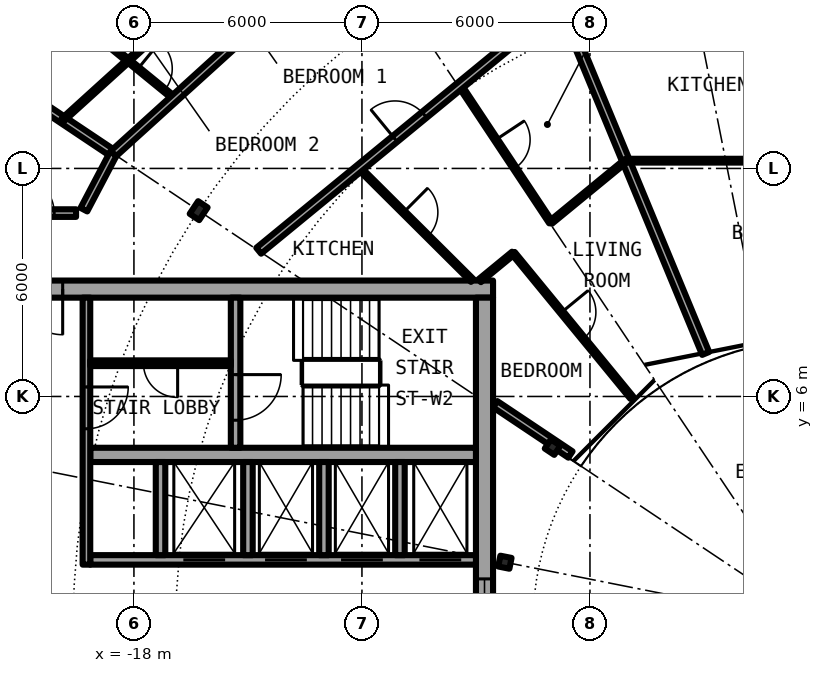
"""IFC4 building model, lengths in metres.
Left out: names, types, materials, properties, quantities, classifications, styles, units other than length and angle.
Written with IfcOpenShell. Run it as: python <this file> out.ifc"""

import sys

from ifc_helpers import new_model, si_unit, direction, frame, frame_2d, origin, origin_2d, place, context, subcontext, project, spatial, rectangle, i_section, extrude, element, fill, save


model = new_model("IFC4")
c1 = context("Model", 3, precision=1e-05, world=origin(), true_north=direction((0.0, 1.0)))
c2 = subcontext(c1, "Body", "Model", "MODEL_VIEW")
j1 = project(units=[si_unit("LENGTHUNIT", "METRE"), si_unit("PLANEANGLEUNIT", "RADIAN")], contexts=[c1])
p1 = place(None, origin())
s1 = spatial("IfcSite", under=j1, at=p1, CompositionType="ELEMENT")
p2 = place(p1, origin())
s2 = spatial("IfcBuilding", under=s1, at=p2, CompositionType="ELEMENT")
p3 = place(p2, frame((0.0, 0.0, 212.7)))
s3 = spatial("IfcBuildingStorey", under=s2, at=p3, CompositionType="ELEMENT", Elevation=212.7)
p4 = place(p3, frame((-16.297, 10.889, 0.0), z_axis=(0.0, 0.0, 1.0), x_axis=(-0.831469612303, 0.55557023302, 0.0)))
e1 = element("IfcColumn", 1, at=p4, inside=s3, PredefinedType="COLUMN", context=c2, shape_type="SweptSolid", body=[
    extrude(i_section(OverallWidth=0.3, OverallDepth=0.4, WebThickness=0.013, FlangeThickness=0.024, FilletRadius=0.027, at=origin_2d()), origin(), (0.0, 0.0, 1.0), 3.05),
])
for number, where, z_axis, x_axis in (
    (2, (-6.984, 4.667, 0.0), (0.0, 0.0, 1.0), (-0.831, 0.556, 0.0)),
    (3, (-8.239, 1.639, 0.0), (0.0, 0.0, 1.0), (-0.981, 0.195, 0.0)),
):
    element("IfcColumn", number, at=place(p3, frame(where, z_axis=z_axis, x_axis=x_axis)), inside=s3, PredefinedType="COLUMN", context=c2, shape_type="SweptSolid", body=[
        extrude(i_section(OverallWidth=0.3, OverallDepth=0.29, WebThickness=0.009, FlangeThickness=0.014, FilletRadius=0.027, at=origin_2d()), origin(), (0.0, 0.0, 1.0), 3.05),
    ])
p5 = place(p3, frame((-8.55, 8.825, 0.0), z_axis=(0.0, 0.0, 1.0), x_axis=(-1.0, 0.0, 0.0)))
e4 = element("IfcWall", 4, at=p5, inside=s3, PredefinedType="SHEAR", context=c2, shape_type="SweptSolid", body=[
    extrude(rectangle(XDim=13.5, YDim=0.45, at=frame_2d((6.75, 0.0))), origin(), (0.0, 0.0, 1.0), 3.05),
])
p6 = place(p5, frame((11.325, 0.0, 0.0)))
e5 = element("IfcOpeningElement", 5, at=p6, cuts=e4, PredefinedType="OPENING", context=c2, shape_type="SweptSolid", body=[
    extrude(rectangle(XDim=1.2, YDim=2.3, at=frame_2d((0.6, 1.15))), frame((0.0, 0.235, 0.0), z_axis=(0.0, -1.0, 0.0), x_axis=(1.0, 0.0, 0.0)), (0.0, 0.0, 1.0), 0.47),
])
p7 = place(p3, frame((-8.775, 8.6, 0.0), z_axis=(0.0, 0.0, 1.0), x_axis=(0.0, -1.0, 0.0)))
e6 = element("IfcWall", 6, at=p7, inside=s3, PredefinedType="SHEAR", context=c2, shape_type="SweptSolid", body=[
    extrude(rectangle(XDim=17.2, YDim=0.45, at=frame_2d((8.6, 0.0))), origin(), (0.0, 0.0, 1.0), 3.05),
])
p8 = place(p7, frame((7.4, 0.0, 0.1)))
e7 = element("IfcOpeningElement", 7, at=p8, cuts=e6, PredefinedType="OPENING", context=c2, shape_type="SweptSolid", body=[
    extrude(rectangle(XDim=2.4, YDim=2.2, at=frame_2d((1.2, 1.1))), frame((0.0, 0.235, 0.0), z_axis=(0.0, -1.0, 0.0), x_axis=(1.0, 0.0, 0.0)), (0.0, 0.0, 1.0), 0.47),
])
p9 = place(p3, frame((-9.0, 1.7, 0.0), z_axis=(0.0, 0.0, 1.0), x_axis=(-1.0, 0.0, 0.0)))
e8 = element("IfcWall", 8, at=p9, inside=s3, PredefinedType="SHEAR", context=c2, shape_type="SweptSolid", body=[
    extrude(rectangle(XDim=10.15, YDim=0.25, at=frame_2d((5.075, 0.0))), origin(), (0.0, 0.0, 1.0), 3.05),
])
p10 = place(p9, frame((0.387, 0.0, 0.0)))
e9 = element("IfcOpeningElement", 9, at=p10, cuts=e8, PredefinedType="OPENING", context=c2, shape_type="SweptSolid", body=[
    extrude(rectangle(XDim=1.1, YDim=2.3, at=frame_2d((0.55, 1.15))), frame((0.0, 0.135, 0.0), z_axis=(0.0, -1.0, 0.0), x_axis=(1.0, 0.0, 0.0)), (0.0, 0.0, 1.0), 0.27),
])
p11 = place(p9, frame((2.45, 0.0, 0.0)))
e10 = element("IfcOpeningElement", 10, at=p11, cuts=e8, PredefinedType="OPENING", context=c2, shape_type="SweptSolid", body=[
    extrude(rectangle(XDim=1.1, YDim=2.3, at=frame_2d((0.55, 1.15))), frame((0.0, 0.135, 0.0), z_axis=(0.0, -1.0, 0.0), x_axis=(1.0, 0.0, 0.0)), (0.0, 0.0, 1.0), 0.27),
])
p12 = place(p9, frame((4.45, 0.0, 0.0)))
e11 = element("IfcOpeningElement", 11, at=p12, cuts=e8, PredefinedType="OPENING", context=c2, shape_type="SweptSolid", body=[
    extrude(rectangle(XDim=1.1, YDim=2.3, at=frame_2d((0.55, 1.15))), frame((0.0, 0.135, 0.0), z_axis=(0.0, -1.0, 0.0), x_axis=(1.0, 0.0, 0.0)), (0.0, 0.0, 1.0), 0.27),
])
p13 = place(p9, frame((6.6, 0.0, 0.0)))
e12 = element("IfcOpeningElement", 12, at=p13, cuts=e8, PredefinedType="OPENING", context=c2, shape_type="SweptSolid", body=[
    extrude(rectangle(XDim=1.1, YDim=2.3, at=frame_2d((0.55, 1.15))), frame((0.0, 0.135, 0.0), z_axis=(0.0, -1.0, 0.0), x_axis=(1.0, 0.0, 0.0)), (0.0, 0.0, 1.0), 0.27),
])
p14 = place(p3, frame((-9.0, 4.462, 0.0), z_axis=(0.0, 0.0, 1.0), x_axis=(-1.0, 0.0, 0.0)))
e13 = element("IfcWall", 13, at=p14, inside=s3, PredefinedType="SHEAR", context=c2, shape_type="SweptSolid", body=[
    extrude(rectangle(XDim=10.15, YDim=0.375, at=frame_2d((5.075, 0.0))), origin(), (0.0, 0.0, 1.0), 3.05),
])
p15 = place(p3, frame((-15.325, 8.6, 0.0), z_axis=(0.0, 0.0, 1.0), x_axis=(0.0, -1.0, 0.0)))
e14 = element("IfcWall", 14, at=p15, inside=s3, PredefinedType="SHEAR", context=c2, shape_type="SweptSolid", body=[
    extrude(rectangle(XDim=3.95, YDim=0.25, at=frame_2d((1.975, 0.0))), origin(), (0.0, 0.0, 1.0), 3.05),
])
p16 = place(p15, frame((2.025, 0.0, 0.0)))
e15 = element("IfcOpeningElement", 15, at=p16, cuts=e14, PredefinedType="OPENING", context=c2, shape_type="SweptSolid", body=[
    extrude(rectangle(XDim=1.2, YDim=2.3, at=frame_2d((0.6, 1.15))), frame((0.0, 0.135, 0.0), z_axis=(0.0, -1.0, 0.0), x_axis=(1.0, 0.0, 0.0)), (0.0, 0.0, 1.0), 0.27),
])
for number, where, z_axis, x_axis in (
    (16, (-15.0, 1.825, 0.0), (0.0, 0.0, 1.0), (0.0, 1.0, 0.0)),
    (17, (-17.3, 1.825, 0.0), (0.0, 0.0, 1.0), (0.0, 1.0, 0.0)),
):
    element("IfcWall", number, at=place(p3, frame(where, z_axis=z_axis, x_axis=x_axis)), inside=s3, PredefinedType="SOLIDWALL", context=c2, shape_type="SweptSolid", body=[
        extrude(rectangle(XDim=2.45, YDim=0.25, at=frame_2d((1.225, 0.0))), origin(), (0.0, 0.0, 1.0), 2.7),
    ])
p17 = place(p3, frame((-19.25, 8.6, 0.0), z_axis=(0.0, 0.0, 1.0), x_axis=(0.0, -1.0, 0.0)))
e18 = element("IfcWall", 18, at=p17, inside=s3, PredefinedType="SOLIDWALL", context=c2, shape_type="SweptSolid", body=[
    extrude(rectangle(XDim=7.025, YDim=0.2, at=frame_2d((3.513, 0.0))), origin(), (0.0, 0.0, 1.0), 2.7),
])
p18 = place(p17, frame((2.35, 0.0, 0.0)))
e19 = element("IfcOpeningElement", 19, at=p18, cuts=e18, PredefinedType="OPENING", context=c2, shape_type="SweptSolid", body=[
    extrude(rectangle(XDim=1.1, YDim=2.3, at=frame_2d((0.55, 1.15))), frame((0.0, 0.11, 0.0), z_axis=(0.0, -1.0, 0.0), x_axis=(1.0, 0.0, 0.0)), (0.0, 0.0, 1.0), 0.22),
])
for number, where, z_axis, x_axis in (
    (20, (-11.0, 1.825, 0.0), (0.0, 0.0, 1.0), (0.0, 1.0, 0.0)),
    (21, (-13.0, 1.825, 0.0), (0.0, 0.0, 1.0), (0.0, 1.0, 0.0)),
):
    element("IfcWall", number, at=place(p3, frame(where, z_axis=z_axis, x_axis=x_axis)), inside=s3, PredefinedType="SOLIDWALL", context=c2, shape_type="SweptSolid", body=[
        extrude(rectangle(XDim=2.45, YDim=0.25, at=frame_2d((1.225, 0.0))), origin(), (0.0, 0.0, 1.0), 2.7),
    ])
p19 = place(p3, frame((-15.45, 6.875, 0.0), z_axis=(0.0, 0.0, 1.0), x_axis=(-1.0, 0.0, 0.0)))
e22 = element("IfcWall", 22, at=p19, inside=s3, PredefinedType="PARTITIONING", context=c2, shape_type="SweptSolid", body=[
    extrude(rectangle(XDim=3.7, YDim=0.15, at=frame_2d((1.85, 0.0))), origin(), (0.0, 0.0, 1.0), 2.7),
])
p20 = place(p19, frame((1.4, 0.0, 0.0)))
e23 = element("IfcOpeningElement", 23, at=p20, cuts=e22, PredefinedType="OPENING", context=c2, shape_type="SweptSolid", body=[
    extrude(rectangle(XDim=0.9, YDim=2.3, at=frame_2d((0.45, 1.15))), frame((0.0, 0.085, 0.0), z_axis=(0.0, -1.0, 0.0), x_axis=(1.0, 0.0, 0.0)), (0.0, 0.0, 1.0), 0.17),
])
p21 = place(p3, frame((-22.595, 15.098, 0.0), z_axis=(0.0, 0.0, 1.0), x_axis=(0.831387096605, -0.55569370664, 0.0)))
e24 = element("IfcWall", 24, at=p21, inside=s3, PredefinedType="PARTITIONING", context=c2, shape_type="SweptSolid", body=[
    extrude(rectangle(XDim=4.875, YDim=0.2, at=frame_2d((2.438, 0.0))), origin(), (0.0, 0.0, 1.0), 2.7),
])
p22 = place(p3, frame((-21.04, 17.199, 0.0), z_axis=(0.0, 0.0, 1.0), x_axis=(0.774310172558, -0.632806255241, 0.0)))
e25 = element("IfcWall", 25, at=p22, inside=s3, PredefinedType="PARTITIONING", context=c2, shape_type="SweptSolid", body=[
    extrude(rectangle(XDim=5.3, YDim=0.1, at=frame_2d((2.65, 0.0))), origin(), (0.0, 0.0, 1.0), 2.7),
])
p23 = place(p22, frame((4.066, 0.0, 0.0)))
e26 = element("IfcOpeningElement", 26, at=p23, cuts=e25, PredefinedType="OPENING", context=c2, shape_type="SweptSolid", body=[
    extrude(rectangle(XDim=0.9, YDim=2.3, at=frame_2d((0.45, 1.15))), frame((0.0, 0.06, 0.0), z_axis=(0.0, -1.0, 0.0), x_axis=(1.0, 0.0, 0.0)), (0.0, 0.0, 1.0), 0.12),
])
p24 = place(p22, frame((1.416, 0.0, 0.0)))
e27 = element("IfcOpeningElement", 27, at=p24, cuts=e25, PredefinedType="OPENING", context=c2, shape_type="SweptSolid", body=[
    extrude(rectangle(XDim=0.9, YDim=2.3, at=frame_2d((0.45, 1.15))), frame((0.0, 0.06, 0.0), z_axis=(0.0, -1.0, 0.0), x_axis=(1.0, 0.0, 0.0)), (0.0, 0.0, 1.0), 0.12),
])
p25 = place(p3, frame((-12.069, 12.007, 0.0), z_axis=(0.0, 0.0, 1.0), x_axis=(0.708909651863, -0.705299302067, 0.0)))
e28 = element("IfcWall", 28, at=p25, inside=s3, PredefinedType="PARTITIONING", context=c2, shape_type="SweptSolid", body=[
    extrude(rectangle(XDim=4.193, YDim=0.1, at=frame_2d((2.096, 0.0))), origin(), (0.0, 0.0, 1.0), 2.7),
])
p26 = place(p25, frame((1.646, 0.0, 0.0)))
e29 = element("IfcOpeningElement", 29, at=p26, cuts=e28, PredefinedType="OPENING", context=c2, shape_type="SweptSolid", body=[
    extrude(rectangle(XDim=0.9, YDim=2.3, at=frame_2d((0.45, 1.15))), frame((0.0, 0.06, 0.0), z_axis=(0.0, -1.0, 0.0), x_axis=(1.0, 0.0, 0.0)), (0.0, 0.0, 1.0), 0.12),
])
p27 = place(p3, frame((-9.421, 14.18, 0.0), z_axis=(0.0, 0.0, 1.0), x_axis=(0.553303732327, -0.832979579457, 0.0)))
e30 = element("IfcWall", 30, at=p27, inside=s3, PredefinedType="PARTITIONING", context=c2, shape_type="SweptSolid", body=[
    extrude(rectangle(XDim=4.319, YDim=0.1, at=frame_2d((2.16, 0.0))), origin(), (0.0, 0.0, 1.0), 2.7),
])
p28 = place(p27, frame((1.71, 0.0, 0.0)))
e31 = element("IfcOpeningElement", 31, at=p28, cuts=e30, PredefinedType="OPENING", context=c2, shape_type="SweptSolid", body=[
    extrude(rectangle(XDim=0.9, YDim=2.3, at=frame_2d((0.45, 1.15))), frame((0.0, 0.06, 0.0), z_axis=(0.0, -1.0, 0.0), x_axis=(1.0, 0.0, 0.0)), (0.0, 0.0, 1.0), 0.12),
])
p29 = place(p3, frame((-8.019, 9.771, 0.0), z_axis=(0.0, 0.0, 1.0), x_axis=(0.634401778971, -0.773003481776, 0.0)))
e32 = element("IfcWall", 32, at=p29, inside=s3, PredefinedType="PARTITIONING", context=c2, shape_type="SweptSolid", body=[
    extrude(rectangle(XDim=4.92, YDim=0.1, at=frame_2d((2.46, 0.0))), origin(), (0.0, 0.0, 1.0), 2.7),
])
p30 = place(p29, frame((2.01, 0.0, 0.0)))
e33 = element("IfcOpeningElement", 33, at=p30, cuts=e32, PredefinedType="OPENING", context=c2, shape_type="SweptSolid", body=[
    extrude(rectangle(XDim=0.9, YDim=2.3, at=frame_2d((0.45, 1.15))), frame((0.0, 0.06, 0.0), z_axis=(0.0, -1.0, 0.0), x_axis=(1.0, 0.0, 0.0)), (0.0, 0.0, 1.0), 0.12),
])
p31 = place(p3, frame((-6.773, 16.353, 0.0), z_axis=(0.0, 0.0, 1.0), x_axis=(0.382549125466, -0.923935152814, 0.0)))
e34 = element("IfcWall", 34, at=p31, inside=s3, PredefinedType="PARTITIONING", context=c2, shape_type="SweptSolid", body=[
    extrude(rectangle(XDim=9.98, YDim=0.2, at=frame_2d((4.99, 0.0))), origin(), (0.0, 0.0, 1.0), 2.7),
])
p32 = place(p3, frame((-6.513, 4.472, 0.0), z_axis=(0.0, 0.0, 1.0), x_axis=(-0.831403409976, 0.555669299026, 0.0)))
e35 = element("IfcWall", 35, at=p32, inside=s3, PredefinedType="PARTITIONING", context=c2, shape_type="SweptSolid", body=[
    extrude(rectangle(XDim=2.383, YDim=0.2, at=frame_2d((1.191, 0.0))), origin(), (0.0, 0.0, 1.0), 2.7),
])
p33 = place(p3, frame((-21.675, 10.825, 0.0), z_axis=(0.0, 0.0, 1.0), x_axis=(1.0, 0.0, 0.0)))
e36 = element("IfcWall", 36, at=p33, inside=s3, PredefinedType="PARTITIONING", context=c2, shape_type="SweptSolid", body=[
    extrude(rectangle(XDim=2.152, YDim=0.2, at=frame_2d((1.076, 0.0))), origin(), (0.0, 0.0, 1.0), 2.7),
])
p34 = place(p33, frame((0.576, 0.0, 0.0)))
e37 = element("IfcOpeningElement", 37, at=p34, cuts=e36, PredefinedType="OPENING", context=c2, shape_type="SweptSolid", body=[
    extrude(rectangle(XDim=1.0, YDim=2.3, at=frame_2d((0.5, 1.15))), frame((0.0, 0.11, 0.0), z_axis=(0.0, -1.0, 0.0), x_axis=(1.0, 0.0, 0.0)), (0.0, 0.0, 1.0), 0.22),
])
p35 = place(p3, frame((-5.055, 12.204, 0.0), z_axis=(0.0, 0.0, 1.0), x_axis=(1.0, 0.0, 0.0)))
e38 = element("IfcWall", 38, at=p35, inside=s3, PredefinedType="PARTITIONING", context=c2, shape_type="SweptSolid", body=[
    extrude(rectangle(XDim=6.319, YDim=0.1, at=frame_2d((3.159, 0.0))), origin(), (0.0, 0.0, 1.0), 2.7),
])
p36 = place(p3, frame((-8.902, 9.046, 0.0), z_axis=(0.0, 0.0, 1.0), x_axis=(0.772842270779, 0.63459815986, 0.0)))
e39 = element("IfcWall", 39, at=p36, inside=s3, PredefinedType="PARTITIONING", context=c2, shape_type="SweptSolid", body=[
    extrude(rectangle(XDim=1.143, YDim=0.1, at=frame_2d((0.571, 0.0))), origin(), (0.0, 0.0, 1.0), 2.7),
])
p37 = place(p3, frame((-7.033, 10.581, 0.0), z_axis=(0.0, 0.0, 1.0), x_axis=(0.772990508216, 0.634417586617, 0.0)))
e40 = element("IfcWall", 40, at=p37, inside=s3, PredefinedType="PARTITIONING", context=c2, shape_type="SweptSolid", body=[
    extrude(rectangle(XDim=2.556, YDim=0.1, at=frame_2d((1.278, 0.0))), origin(), (0.0, 0.0, 1.0), 2.7),
])
p38 = place(p3, frame((-14.717, 9.834, 0.0), z_axis=(0.0, 0.0, 1.0), x_axis=(0.773034536097, 0.634363938131, 0.0)))
e41 = element("IfcWall", 41, at=p38, inside=s3, PredefinedType="PARTITIONING", context=c2, shape_type="SweptSolid", body=[
    extrude(rectangle(XDim=10.277, YDim=0.2, at=frame_2d((5.138, 0.0))), origin(), (0.0, 0.0, 1.0), 2.7),
])
p39 = place(p38, frame((4.638, 0.0, 0.0)))
e42 = element("IfcOpeningElement", 42, at=p39, cuts=e41, PredefinedType="OPENING", context=c2, shape_type="SweptSolid", body=[
    extrude(rectangle(XDim=1.0, YDim=2.3, at=frame_2d((0.5, 1.15))), frame((0.0, 0.11, 0.0), z_axis=(0.0, -1.0, 0.0), x_axis=(1.0, 0.0, 0.0)), (0.0, 0.0, 1.0), 0.22),
])
p40 = place(p3, frame((-18.543, 12.386, 0.0), z_axis=(0.0, 0.0, 1.0), x_axis=(0.740853508928, 0.671666642248, 0.0)))
e43 = element("IfcWall", 43, at=p40, inside=s3, PredefinedType="PARTITIONING", context=c2, shape_type="SweptSolid", body=[
    extrude(rectangle(XDim=10.84, YDim=0.2, at=frame_2d((5.42, 0.0))), origin(), (0.0, 0.0, 1.0), 2.7),
])
p41 = place(p40, frame((4.921, 0.0, 0.0)))
e44 = element("IfcOpeningElement", 44, at=p41, cuts=e43, PredefinedType="OPENING", context=c2, shape_type="SweptSolid", body=[
    extrude(rectangle(XDim=1.0, YDim=2.3, at=frame_2d((0.5, 1.15))), frame((0.0, 0.11, 0.0), z_axis=(0.0, -1.0, 0.0), x_axis=(1.0, 0.0, 0.0)), (0.0, 0.0, 1.0), 0.22),
])
p42 = place(p3, frame((-19.317, 10.915, 0.0), z_axis=(0.0, 0.0, 1.0), x_axis=(0.465359652486, 0.885121683068, 0.0)))
e45 = element("IfcWall", 45, at=p42, inside=s3, PredefinedType="PARTITIONING", context=c2, shape_type="SweptSolid", body=[
    extrude(rectangle(XDim=1.665, YDim=0.2, at=frame_2d((0.833, 0.0))), origin(), (0.0, 0.0, 1.0), 2.7),
])
p43 = place(p3, frame((-19.872, 13.278, 0.0), z_axis=(0.0, 0.0, 1.0), x_axis=(0.740923753351, 0.671589153962, 0.0)))
e46 = element("IfcWall", 46, at=p43, inside=s3, PredefinedType="PARTITIONING", context=c2, shape_type="SweptSolid", body=[
    extrude(rectangle(XDim=6.969, YDim=0.1, at=frame_2d((3.484, 0.0))), origin(), (0.0, 0.0, 1.0), 2.7),
])
p44 = place(p43, frame((3.034, 0.0, 0.0)))
e47 = element("IfcOpeningElement", 47, at=p44, cuts=e46, PredefinedType="OPENING", context=c2, shape_type="SweptSolid", body=[
    extrude(rectangle(XDim=0.9, YDim=2.3, at=frame_2d((0.45, 1.15))), frame((0.0, 0.06, 0.0), z_axis=(0.0, -1.0, 0.0), x_axis=(1.0, 0.0, 0.0)), (0.0, 0.0, 1.0), 0.12),
])
p45 = place(p10, origin())
e48 = element("IfcDoor", 48, at=p45, inside=s3, OperationType="DOUBLE_DOOR_SLIDING", PredefinedType="DOOR", context=c2, shape_type="SweptSolid", body=[
    extrude(rectangle(XDim=1.1, YDim=2.3, at=frame_2d((0.55, 1.15))), frame((0.0, 0.025, 0.0), z_axis=(0.0, -1.0, 0.0), x_axis=(1.0, 0.0, 0.0)), (0.0, 0.0, 1.0), 0.05),
])
fill(e9, e48)
p46 = place(p11, origin())
e49 = element("IfcDoor", 49, at=p46, inside=s3, OperationType="DOUBLE_DOOR_SLIDING", PredefinedType="DOOR", context=c2, shape_type="SweptSolid", body=[
    extrude(rectangle(XDim=1.1, YDim=2.3, at=frame_2d((0.55, 1.15))), frame((0.0, 0.025, 0.0), z_axis=(0.0, -1.0, 0.0), x_axis=(1.0, 0.0, 0.0)), (0.0, 0.0, 1.0), 0.05),
])
fill(e10, e49)
p47 = place(p12, origin())
e50 = element("IfcDoor", 50, at=p47, inside=s3, OperationType="DOUBLE_DOOR_SLIDING", PredefinedType="DOOR", context=c2, shape_type="SweptSolid", body=[
    extrude(rectangle(XDim=1.1, YDim=2.3, at=frame_2d((0.55, 1.15))), frame((0.0, 0.025, 0.0), z_axis=(0.0, -1.0, 0.0), x_axis=(1.0, 0.0, 0.0)), (0.0, 0.0, 1.0), 0.05),
])
fill(e11, e50)
p48 = place(p13, origin())
e51 = element("IfcDoor", 51, at=p48, inside=s3, OperationType="DOUBLE_DOOR_SLIDING", PredefinedType="DOOR", context=c2, shape_type="SweptSolid", body=[
    extrude(rectangle(XDim=1.1, YDim=2.3, at=frame_2d((0.55, 1.15))), frame((0.0, 0.025, 0.0), z_axis=(0.0, -1.0, 0.0), x_axis=(1.0, 0.0, 0.0)), (0.0, 0.0, 1.0), 0.05),
])
fill(e12, e51)
p49 = place(p20, origin())
e52 = element("IfcDoor", 52, at=p49, inside=s3, OperationType="SINGLE_SWING_LEFT", PredefinedType="DOOR", context=c2, shape_type="SweptSolid", body=[
    extrude(rectangle(XDim=0.9, YDim=2.3, at=frame_2d((0.45, 1.15))), frame((0.0, 0.025, 0.0), z_axis=(0.0, -1.0, 0.0), x_axis=(1.0, 0.0, 0.0)), (0.0, 0.0, 1.0), 0.05),
])
fill(e23, e52)
p50 = place(p16, origin())
e53 = element("IfcDoor", 53, at=p50, inside=s3, OperationType="SINGLE_SWING_LEFT", PredefinedType="DOOR", context=c2, shape_type="SweptSolid", body=[
    extrude(rectangle(XDim=1.2, YDim=2.3, at=frame_2d((0.6, 1.15))), frame((0.0, 0.025, 0.0), z_axis=(0.0, -1.0, 0.0), x_axis=(1.0, 0.0, 0.0)), (0.0, 0.0, 1.0), 0.05),
])
fill(e15, e53)
p51 = place(p18, origin())
e54 = element("IfcDoor", 54, at=p51, inside=s3, OperationType="SINGLE_SWING_RIGHT", PredefinedType="DOOR", context=c2, shape_type="SweptSolid", body=[
    extrude(rectangle(XDim=1.1, YDim=2.3, at=frame_2d((0.55, 1.15))), frame((0.0, 0.025, 0.0), z_axis=(0.0, -1.0, 0.0), x_axis=(1.0, 0.0, 0.0)), (0.0, 0.0, 1.0), 0.05),
])
fill(e19, e54)
p52 = place(p6, origin())
e55 = element("IfcDoor", 55, at=p52, inside=s3, OperationType="SINGLE_SWING_LEFT", PredefinedType="DOOR", context=c2, shape_type="SweptSolid", body=[
    extrude(rectangle(XDim=1.2, YDim=2.3, at=frame_2d((0.6, 1.15))), frame((0.0, 0.025, 0.0), z_axis=(0.0, -1.0, 0.0), x_axis=(1.0, 0.0, 0.0)), (0.0, 0.0, 1.0), 0.05),
])
fill(e5, e55)
p53 = place(p8, origin())
e56 = element("IfcWindow", 56, at=p53, inside=s3, PartitioningType="SINGLE_PANEL", PredefinedType="WINDOW", context=c2, shape_type="SweptSolid", body=[
    extrude(rectangle(XDim=2.4, YDim=2.2, at=frame_2d((1.2, 1.1))), frame((0.0, 0.03, 0.0), z_axis=(0.0, -1.0, 0.0), x_axis=(1.0, 0.0, 0.0)), (0.0, 0.0, 1.0), 0.06),
])
fill(e7, e56)
p54 = place(p23, origin())
e57 = element("IfcDoor", 57, at=p54, inside=s3, OperationType="SINGLE_SWING_RIGHT", PredefinedType="DOOR", context=c2, shape_type="SweptSolid", body=[
    extrude(rectangle(XDim=0.9, YDim=2.3, at=frame_2d((0.45, 1.15))), frame((0.0, 0.025, 0.0), z_axis=(0.0, -1.0, 0.0), x_axis=(1.0, 0.0, 0.0)), (0.0, 0.0, 1.0), 0.05),
])
fill(e26, e57)
p55 = place(p39, origin())
e58 = element("IfcDoor", 58, at=p55, inside=s3, OperationType="SINGLE_SWING_LEFT", PredefinedType="DOOR", context=c2, shape_type="SweptSolid", body=[
    extrude(rectangle(XDim=1.0, YDim=2.3, at=frame_2d((0.5, 1.15))), frame((0.0, 0.025, 0.0), z_axis=(0.0, -1.0, 0.0), x_axis=(1.0, 0.0, 0.0)), (0.0, 0.0, 1.0), 0.05),
])
fill(e42, e58)
p56 = place(p28, origin())
e59 = element("IfcDoor", 59, at=p56, inside=s3, OperationType="SINGLE_SWING_RIGHT", PredefinedType="DOOR", context=c2, shape_type="SweptSolid", body=[
    extrude(rectangle(XDim=0.9, YDim=2.3, at=frame_2d((0.45, 1.15))), frame((0.0, 0.025, 0.0), z_axis=(0.0, -1.0, 0.0), x_axis=(1.0, 0.0, 0.0)), (0.0, 0.0, 1.0), 0.05),
])
fill(e31, e59)
p57 = place(p26, origin())
e60 = element("IfcDoor", 60, at=p57, inside=s3, OperationType="SINGLE_SWING_RIGHT", PredefinedType="DOOR", context=c2, shape_type="SweptSolid", body=[
    extrude(rectangle(XDim=0.9, YDim=2.3, at=frame_2d((0.45, 1.15))), frame((0.0, 0.025, 0.0), z_axis=(0.0, -1.0, 0.0), x_axis=(1.0, 0.0, 0.0)), (0.0, 0.0, 1.0), 0.05),
])
fill(e29, e60)
p58 = place(p30, origin())
e61 = element("IfcDoor", 61, at=p58, inside=s3, OperationType="SINGLE_SWING_RIGHT", PredefinedType="DOOR", context=c2, shape_type="SweptSolid", body=[
    extrude(rectangle(XDim=0.9, YDim=2.3, at=frame_2d((0.45, 1.15))), frame((0.0, 0.025, 0.0), z_axis=(0.0, -1.0, 0.0), x_axis=(1.0, 0.0, 0.0)), (0.0, 0.0, 1.0), 0.05),
])
fill(e33, e61)
p59 = place(p34, origin())
e62 = element("IfcDoor", 62, at=p59, inside=s3, OperationType="SINGLE_SWING_LEFT", PredefinedType="DOOR", context=c2, shape_type="SweptSolid", body=[
    extrude(rectangle(XDim=1.0, YDim=2.3, at=frame_2d((0.5, 1.15))), frame((0.0, 0.025, 0.0), z_axis=(0.0, -1.0, 0.0), x_axis=(1.0, 0.0, 0.0)), (0.0, 0.0, 1.0), 0.05),
])
fill(e37, e62)
save(model, sys.argv[1])
